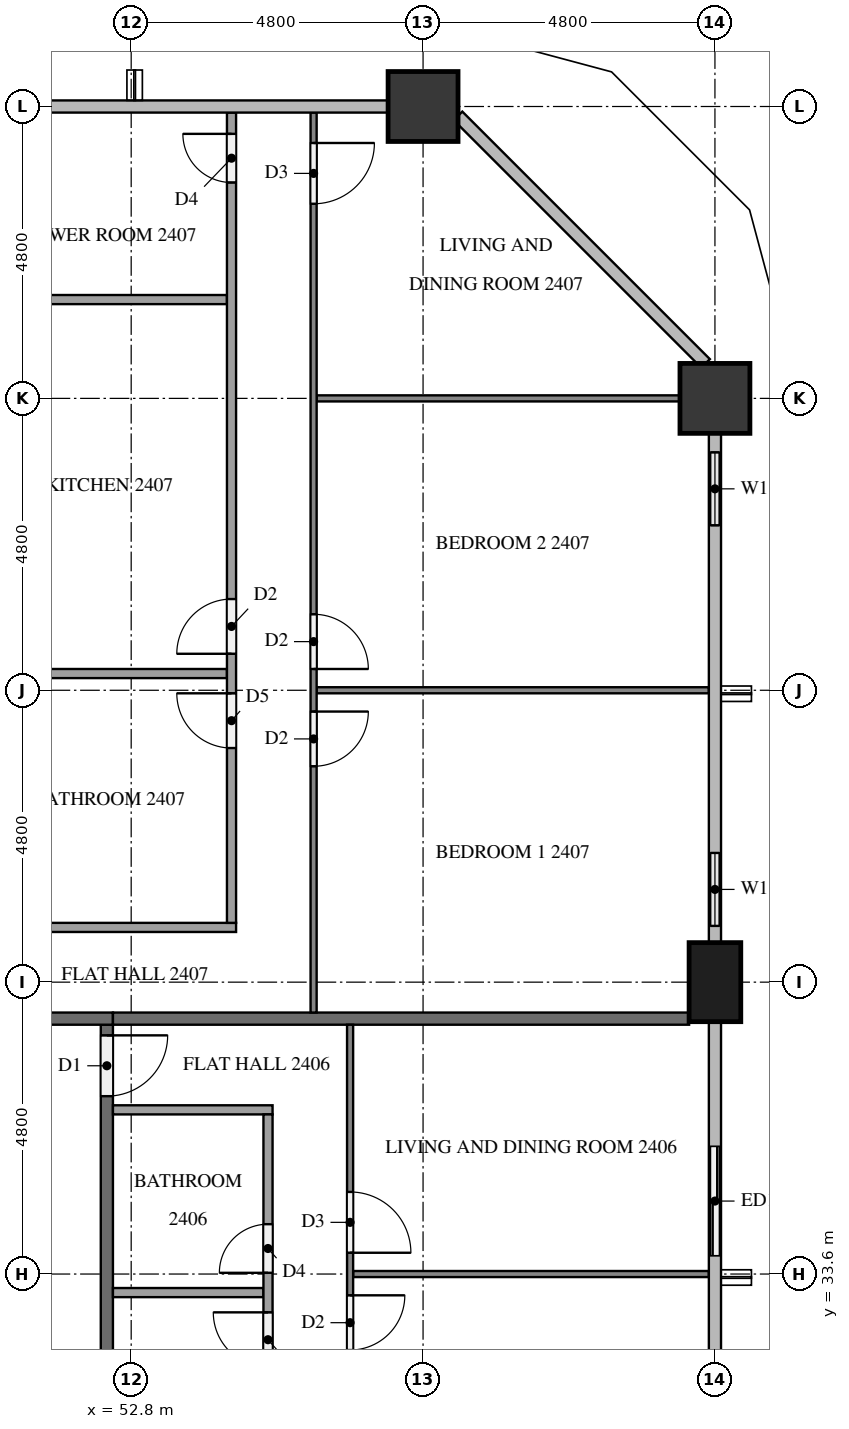
"""IFC4 building model, lengths in metres.
Left out: names, types, materials, properties, quantities, classifications, styles, units other than length and angle.
Written with IfcOpenShell. Run it as: python <this file> out.ifc"""

import sys

from ifc_helpers import new_model, si_unit, direction, frame, frame_2d, origin, origin_2d, place, context, subcontext, project, spatial, rectangle, extrude, element, fill, save


model = new_model("IFC4")
c1 = context("Model", 3, precision=1e-05, world=origin(), true_north=direction((0.0, 1.0)))
c2 = subcontext(c1, "Body", "Model", "MODEL_VIEW")
j1 = project(units=[si_unit("LENGTHUNIT", "METRE"), si_unit("PLANEANGLEUNIT", "RADIAN")], contexts=[c1])
p1 = place(None, origin())
s1 = spatial("IfcSite", under=j1, at=p1, CompositionType="ELEMENT")
p2 = place(p1, origin())
s2 = spatial("IfcBuilding", under=s1, at=p2, CompositionType="ELEMENT")
p3 = place(p2, frame((0.0, 0.0, 96.2)))
s3 = spatial("IfcBuildingStorey", under=s2, at=p3, CompositionType="ELEMENT", Elevation=96.2)
p4 = place(p3, frame((62.4, 38.4, 0.0), z_axis=(0.0, 0.0, 1.0), x_axis=(0.0, 1.0, 0.0)))
e1 = element("IfcColumn", 1, at=p4, inside=s3, PredefinedType="COLUMN", context=c2, shape_type="SweptSolid", body=[
    extrude(rectangle(XDim=1.3, YDim=0.85, at=origin_2d()), origin(), (0.0, 0.0, 1.0), 3.2),
])
for number, where, z_axis, x_axis in (
    (2, (62.4, 48.0, 0.0), (0.0, 0.0, 1.0), (1.0, 0.0, 0.0)),
    (3, (57.6, 52.8, 0.0), (0.0, 0.0, 1.0), (1.0, 0.0, 0.0)),
):
    element("IfcColumn", number, at=place(p3, frame(where, z_axis=z_axis, x_axis=x_axis)), inside=s3, PredefinedType="COLUMN", context=c2, shape_type="SweptSolid", body=[
        extrude(rectangle(XDim=1.15, YDim=1.15, at=origin_2d()), origin(), (0.0, 0.0, 1.0), 3.2),
    ])
p5 = place(p3, frame((62.4, 33.6, 0.0), z_axis=(0.0, 0.0, 1.0), x_axis=(0.0, 1.0, 0.0)))
e4 = element("IfcWall", 4, at=p5, inside=s3, PredefinedType="SOLIDWALL", context=c2, shape_type="SweptSolid", body=[
    extrude(rectangle(XDim=2.4, YDim=0.15, at=frame_2d((1.2, 0.0))), origin(), (0.0, 0.0, 1.0), 3.2),
])
p6 = place(p5, frame((0.3, 0.0, 0.0)))
e5 = element("IfcOpeningElement", 5, at=p6, cuts=e4, PredefinedType="OPENING", context=c2, shape_type="SweptSolid", body=[
    extrude(rectangle(XDim=1.8, YDim=2.4, at=frame_2d((0.9, 1.2))), frame((0.0, 0.085, 0.0), z_axis=(0.0, -1.0, 0.0), x_axis=(1.0, 0.0, 0.0)), (0.0, 0.0, 1.0), 0.17),
])
p7 = place(p3, frame((62.4, 39.05, 0.0), z_axis=(0.0, 0.0, 1.0), x_axis=(0.0, 1.0, 0.0)))
e6 = element("IfcWall", 6, at=p7, inside=s3, PredefinedType="SOLIDWALL", context=c2, shape_type="SweptSolid", body=[
    extrude(rectangle(XDim=1.75, YDim=0.15, at=frame_2d((0.875, 0.0))), origin(), (0.0, 0.0, 1.0), 3.2),
])
p8 = place(p7, frame((0.275, 0.0, 0.9)))
e7 = element("IfcOpeningElement", 7, at=p8, cuts=e6, PredefinedType="OPENING", context=c2, shape_type="SweptSolid", body=[
    extrude(rectangle(XDim=1.2, YDim=1.4, at=frame_2d((0.6, 0.7))), frame((0.0, 0.085, 0.0), z_axis=(0.0, -1.0, 0.0), x_axis=(1.0, 0.0, 0.0)), (0.0, 0.0, 1.0), 0.17),
])
p9 = place(p3, frame((62.4, 45.6, 0.0), z_axis=(0.0, 0.0, 1.0), x_axis=(0.0, 1.0, 0.0)))
e8 = element("IfcWall", 8, at=p9, inside=s3, PredefinedType="SOLIDWALL", context=c2, shape_type="SweptSolid", body=[
    extrude(rectangle(XDim=1.825, YDim=0.15, at=frame_2d((0.913, 0.0))), origin(), (0.0, 0.0, 1.0), 3.2),
])
p10 = place(p9, frame((0.312, 0.0, 0.9)))
e9 = element("IfcOpeningElement", 9, at=p10, cuts=e8, PredefinedType="OPENING", context=c2, shape_type="SweptSolid", body=[
    extrude(rectangle(XDim=1.2, YDim=1.4, at=frame_2d((0.6, 0.7))), frame((0.0, 0.085, 0.0), z_axis=(0.0, -1.0, 0.0), x_axis=(1.0, 0.0, 0.0)), (0.0, 0.0, 1.0), 0.17),
])
p11 = place(p3, frame((52.4, 37.7, 0.0), z_axis=(0.0, 0.0, 1.0), x_axis=(0.0, -1.0, 0.0)))
e10 = element("IfcWall", 10, at=p11, inside=s3, PredefinedType="PARTITIONING", context=c2, shape_type="SweptSolid", body=[
    extrude(rectangle(XDim=22.6, YDim=0.2, at=frame_2d((11.3, 0.0))), origin(), (0.0, 0.0, 1.0), 3.2),
])
p12 = place(p11, frame((21.425, 0.0, 0.0)))
e11 = element("IfcOpeningElement", 11, at=p12, cuts=e10, PredefinedType="OPENING", context=c2, shape_type="SweptSolid", body=[
    extrude(rectangle(XDim=1.0, YDim=2.1, at=frame_2d((0.5, 1.05))), frame((0.0, 0.11, 0.0), z_axis=(0.0, -1.0, 0.0), x_axis=(1.0, 0.0, 0.0)), (0.0, 0.0, 1.0), 0.22),
])
p13 = place(p11, frame((0.175, 0.0, 0.0)))
e12 = element("IfcOpeningElement", 12, at=p13, cuts=e10, PredefinedType="OPENING", context=c2, shape_type="SweptSolid", body=[
    extrude(rectangle(XDim=1.0, YDim=2.1, at=frame_2d((0.5, 1.05))), frame((0.0, 0.11, 0.0), z_axis=(0.0, -1.0, 0.0), x_axis=(1.0, 0.0, 0.0)), (0.0, 0.0, 1.0), 0.22),
])
p14 = place(p3, frame((52.5, 37.8, 0.0), z_axis=(0.0, 0.0, 1.0), x_axis=(-1.0, 0.0, 0.0)))
e13 = element("IfcWall", 13, at=p14, inside=s3, PredefinedType="PARTITIONING", context=c2, shape_type="SweptSolid", body=[
    extrude(rectangle(XDim=2.2, YDim=0.2, at=frame_2d((1.1, 0.0))), origin(), (0.0, 0.0, 1.0), 3.2),
])
p15 = place(p3, frame((52.5, 37.8, 0.0), z_axis=(0.0, 0.0, 1.0), x_axis=(1.0, 0.0, 0.0)))
e14 = element("IfcWall", 14, at=p15, inside=s3, PredefinedType="PARTITIONING", context=c2, shape_type="SweptSolid", body=[
    extrude(rectangle(XDim=9.475, YDim=0.2, at=frame_2d((4.738, 0.0))), origin(), (0.0, 0.0, 1.0), 3.2),
])
p16 = place(p3, frame((56.45, 33.6, 0.0), z_axis=(0.0, 0.0, 1.0), x_axis=(1.0, 0.0, 0.0)))
e15 = element("IfcWall", 15, at=p16, inside=s3, PredefinedType="PARTITIONING", context=c2, shape_type="SweptSolid", body=[
    extrude(rectangle(XDim=5.85, YDim=0.1, at=frame_2d((2.925, 0.0))), origin(), (0.0, 0.0, 1.0), 3.2),
])
p17 = place(p3, frame((56.4, 37.7, 0.0), z_axis=(0.0, 0.0, 1.0), x_axis=(0.0, -1.0, 0.0)))
e16 = element("IfcWall", 16, at=p17, inside=s3, PredefinedType="PARTITIONING", context=c2, shape_type="SweptSolid", body=[
    extrude(rectangle(XDim=8.8, YDim=0.1, at=frame_2d((4.4, 0.0))), origin(), (0.0, 0.0, 1.0), 3.2),
])
p18 = place(p17, frame((2.75, 0.0, 0.0)))
e17 = element("IfcOpeningElement", 17, at=p18, cuts=e16, PredefinedType="OPENING", context=c2, shape_type="SweptSolid", body=[
    extrude(rectangle(XDim=1.0, YDim=2.1, at=frame_2d((0.5, 1.05))), frame((0.0, 0.06, 0.0), z_axis=(0.0, -1.0, 0.0), x_axis=(1.0, 0.0, 0.0)), (0.0, 0.0, 1.0), 0.12),
])
p19 = place(p17, frame((4.45, 0.0, 0.0)))
e18 = element("IfcOpeningElement", 18, at=p19, cuts=e16, PredefinedType="OPENING", context=c2, shape_type="SweptSolid", body=[
    extrude(rectangle(XDim=0.9, YDim=2.1, at=frame_2d((0.45, 1.05))), frame((0.0, 0.06, 0.0), z_axis=(0.0, -1.0, 0.0), x_axis=(1.0, 0.0, 0.0)), (0.0, 0.0, 1.0), 0.12),
])
p20 = place(p3, frame((52.5, 33.295, 0.0), z_axis=(0.0, 0.0, 1.0), x_axis=(1.0, 0.0, 0.0)))
e19 = element("IfcWall", 19, at=p20, inside=s3, PredefinedType="PARTITIONING", context=c2, shape_type="SweptSolid", body=[
    extrude(rectangle(XDim=2.475, YDim=0.15, at=frame_2d((1.238, 0.0))), origin(), (0.0, 0.0, 1.0), 3.2),
])
p21 = place(p3, frame((52.5, 36.3, 0.0), z_axis=(0.0, 0.0, 1.0), x_axis=(1.0, 0.0, 0.0)))
e20 = element("IfcWall", 20, at=p21, inside=s3, PredefinedType="PARTITIONING", context=c2, shape_type="SweptSolid", body=[
    extrude(rectangle(XDim=2.625, YDim=0.15, at=frame_2d((1.312, 0.0))), origin(), (0.0, 0.0, 1.0), 3.2),
])
p22 = place(p3, frame((55.05, 28.9, 0.0), z_axis=(0.0, 0.0, 1.0), x_axis=(0.0, 1.0, 0.0)))
e21 = element("IfcWall", 21, at=p22, inside=s3, PredefinedType="PARTITIONING", context=c2, shape_type="SweptSolid", body=[
    extrude(rectangle(XDim=7.325, YDim=0.15, at=frame_2d((3.663, 0.0))), origin(), (0.0, 0.0, 1.0), 3.2),
])
p23 = place(p22, frame((4.72, 0.0, 0.0)))
e22 = element("IfcOpeningElement", 22, at=p23, cuts=e21, PredefinedType="OPENING", context=c2, shape_type="SweptSolid", body=[
    extrude(rectangle(XDim=0.8, YDim=2.1, at=frame_2d((0.4, 1.05))), frame((0.0, 0.085, 0.0), z_axis=(0.0, -1.0, 0.0), x_axis=(1.0, 0.0, 0.0)), (0.0, 0.0, 1.0), 0.17),
])
p24 = place(p22, frame((3.17, 0.0, 0.0)))
e23 = element("IfcOpeningElement", 23, at=p24, cuts=e21, PredefinedType="OPENING", context=c2, shape_type="SweptSolid", body=[
    extrude(rectangle(XDim=0.9, YDim=2.1, at=frame_2d((0.45, 1.05))), frame((0.0, 0.085, 0.0), z_axis=(0.0, -1.0, 0.0), x_axis=(1.0, 0.0, 0.0)), (0.0, 0.0, 1.0), 0.17),
])
p25 = place(p3, frame((55.85, 43.2, 0.0), z_axis=(0.0, 0.0, 1.0), x_axis=(1.0, 0.0, 0.0)))
e24 = element("IfcWall", 24, at=p25, inside=s3, PredefinedType="PARTITIONING", context=c2, shape_type="SweptSolid", body=[
    extrude(rectangle(XDim=6.45, YDim=0.1, at=frame_2d((3.225, 0.0))), origin(), (0.0, 0.0, 1.0), 3.2),
])
p26 = place(p3, frame((55.85, 48.0, 0.0), z_axis=(0.0, 0.0, 1.0), x_axis=(1.0, 0.0, 0.0)))
e25 = element("IfcWall", 25, at=p26, inside=s3, PredefinedType="PARTITIONING", context=c2, shape_type="SweptSolid", body=[
    extrude(rectangle(XDim=5.975, YDim=0.1, at=frame_2d((2.987, 0.0))), origin(), (0.0, 0.0, 1.0), 3.2),
])
p27 = place(p3, frame((55.8, 52.7, 0.0), z_axis=(0.0, 0.0, 1.0), x_axis=(0.0, -1.0, 0.0)))
e26 = element("IfcWall", 26, at=p27, inside=s3, PredefinedType="PARTITIONING", context=c2, shape_type="SweptSolid", body=[
    extrude(rectangle(XDim=14.8, YDim=0.1, at=frame_2d((7.4, 0.0))), origin(), (0.0, 0.0, 1.0), 3.2),
])
p28 = place(p27, frame((9.85, 0.0, 0.0)))
e27 = element("IfcOpeningElement", 27, at=p28, cuts=e26, PredefinedType="OPENING", context=c2, shape_type="SweptSolid", body=[
    extrude(rectangle(XDim=0.9, YDim=2.1, at=frame_2d((0.45, 1.05))), frame((0.0, 0.06, 0.0), z_axis=(0.0, -1.0, 0.0), x_axis=(1.0, 0.0, 0.0)), (0.0, 0.0, 1.0), 0.12),
])
p29 = place(p27, frame((8.25, 0.0, 0.0)))
e28 = element("IfcOpeningElement", 28, at=p29, cuts=e26, PredefinedType="OPENING", context=c2, shape_type="SweptSolid", body=[
    extrude(rectangle(XDim=0.9, YDim=2.1, at=frame_2d((0.45, 1.05))), frame((0.0, 0.06, 0.0), z_axis=(0.0, -1.0, 0.0), x_axis=(1.0, 0.0, 0.0)), (0.0, 0.0, 1.0), 0.12),
])
p30 = place(p27, frame((0.5, 0.0, 0.0)))
e29 = element("IfcOpeningElement", 29, at=p30, cuts=e26, PredefinedType="OPENING", context=c2, shape_type="SweptSolid", body=[
    extrude(rectangle(XDim=1.0, YDim=2.1, at=frame_2d((0.5, 1.05))), frame((0.0, 0.06, 0.0), z_axis=(0.0, -1.0, 0.0), x_axis=(1.0, 0.0, 0.0)), (0.0, 0.0, 1.0), 0.12),
])
for number, where, z_axis, x_axis in (
    (30, (50.5, 43.475, 0.0), (0.0, 0.0, 1.0), (1.0, 0.0, 0.0)),
    (31, (50.5, 49.625, 0.0), (0.0, 0.0, 1.0), (1.0, 0.0, 0.0)),
):
    element("IfcWall", number, at=place(p3, frame(where, z_axis=z_axis, x_axis=x_axis)), inside=s3, PredefinedType="PARTITIONING", context=c2, shape_type="SweptSolid", body=[
        extrude(rectangle(XDim=3.875, YDim=0.15, at=frame_2d((1.938, 0.0))), origin(), (0.0, 0.0, 1.0), 3.2),
    ])
p31 = place(p3, frame((50.5, 39.3, 0.0), z_axis=(0.0, 0.0, 1.0), x_axis=(1.0, 0.0, 0.0)))
e32 = element("IfcWall", 32, at=p31, inside=s3, PredefinedType="PARTITIONING", context=c2, shape_type="SweptSolid", body=[
    extrude(rectangle(XDim=4.025, YDim=0.15, at=frame_2d((2.012, 0.0))), origin(), (0.0, 0.0, 1.0), 3.2),
])
p32 = place(p3, frame((54.45, 39.375, 0.0), z_axis=(0.0, 0.0, 1.0), x_axis=(0.0, 1.0, 0.0)))
e33 = element("IfcWall", 33, at=p32, inside=s3, PredefinedType="PARTITIONING", context=c2, shape_type="SweptSolid", body=[
    extrude(rectangle(XDim=13.325, YDim=0.15, at=frame_2d((6.663, 0.0))), origin(), (0.0, 0.0, 1.0), 3.2),
])
p33 = place(p32, frame((2.875, 0.0, 0.0)))
e34 = element("IfcOpeningElement", 34, at=p33, cuts=e33, PredefinedType="OPENING", context=c2, shape_type="SweptSolid", body=[
    extrude(rectangle(XDim=0.9, YDim=2.1, at=frame_2d((0.45, 1.05))), frame((0.0, 0.085, 0.0), z_axis=(0.0, -1.0, 0.0), x_axis=(1.0, 0.0, 0.0)), (0.0, 0.0, 1.0), 0.17),
])
p34 = place(p32, frame((4.425, 0.0, 0.0)))
e35 = element("IfcOpeningElement", 35, at=p34, cuts=e33, PredefinedType="OPENING", context=c2, shape_type="SweptSolid", body=[
    extrude(rectangle(XDim=0.9, YDim=2.1, at=frame_2d((0.45, 1.05))), frame((0.0, 0.085, 0.0), z_axis=(0.0, -1.0, 0.0), x_axis=(1.0, 0.0, 0.0)), (0.0, 0.0, 1.0), 0.17),
])
p35 = place(p32, frame((12.175, 0.0, 0.0)))
e36 = element("IfcOpeningElement", 36, at=p35, cuts=e33, PredefinedType="OPENING", context=c2, shape_type="SweptSolid", body=[
    extrude(rectangle(XDim=0.8, YDim=2.1, at=frame_2d((0.4, 1.05))), frame((0.0, 0.085, 0.0), z_axis=(0.0, -1.0, 0.0), x_axis=(1.0, 0.0, 0.0)), (0.0, 0.0, 1.0), 0.17),
])
p36 = place(p6, origin())
e37 = element("IfcDoor", 37, at=p36, inside=s3, OperationType="SLIDING_TO_LEFT", PredefinedType="DOOR", context=c2, shape_type="SweptSolid", body=[
    extrude(rectangle(XDim=1.8, YDim=2.4, at=frame_2d((0.9, 1.2))), frame((0.0, 0.025, 0.0), z_axis=(0.0, -1.0, 0.0), x_axis=(1.0, 0.0, 0.0)), (0.0, 0.0, 1.0), 0.05),
])
fill(e5, e37)
p37 = place(p8, origin())
e38 = element("IfcWindow", 38, at=p37, inside=s3, PartitioningType="SINGLE_PANEL", PredefinedType="WINDOW", context=c2, shape_type="SweptSolid", body=[
    extrude(rectangle(XDim=1.2, YDim=1.4, at=frame_2d((0.6, 0.7))), frame((0.0, 0.03, 0.0), z_axis=(0.0, -1.0, 0.0), x_axis=(1.0, 0.0, 0.0)), (0.0, 0.0, 1.0), 0.06),
])
fill(e7, e38)
p38 = place(p10, origin())
e39 = element("IfcWindow", 39, at=p38, inside=s3, PartitioningType="SINGLE_PANEL", PredefinedType="WINDOW", context=c2, shape_type="SweptSolid", body=[
    extrude(rectangle(XDim=1.2, YDim=1.4, at=frame_2d((0.6, 0.7))), frame((0.0, 0.03, 0.0), z_axis=(0.0, -1.0, 0.0), x_axis=(1.0, 0.0, 0.0)), (0.0, 0.0, 1.0), 0.06),
])
fill(e9, e39)
p39 = place(p13, origin())
e40 = element("IfcDoor", 40, at=p39, inside=s3, OperationType="SINGLE_SWING_LEFT", PredefinedType="DOOR", context=c2, shape_type="SweptSolid", body=[
    extrude(rectangle(XDim=1.0, YDim=2.1, at=frame_2d((0.5, 1.05))), frame((0.0, 0.025, 0.0), z_axis=(0.0, -1.0, 0.0), x_axis=(1.0, 0.0, 0.0)), (0.0, 0.0, 1.0), 0.05),
])
fill(e12, e40)
p40 = place(p18, origin())
e41 = element("IfcDoor", 41, at=p40, inside=s3, OperationType="SINGLE_SWING_RIGHT", PredefinedType="DOOR", context=c2, shape_type="SweptSolid", body=[
    extrude(rectangle(XDim=1.0, YDim=2.1, at=frame_2d((0.5, 1.05))), frame((0.0, 0.025, 0.0), z_axis=(0.0, -1.0, 0.0), x_axis=(1.0, 0.0, 0.0)), (0.0, 0.0, 1.0), 0.05),
])
fill(e17, e41)
p41 = place(p19, origin())
e42 = element("IfcDoor", 42, at=p41, inside=s3, OperationType="SINGLE_SWING_LEFT", PredefinedType="DOOR", context=c2, shape_type="SweptSolid", body=[
    extrude(rectangle(XDim=0.9, YDim=2.1, at=frame_2d((0.45, 1.05))), frame((0.0, 0.025, 0.0), z_axis=(0.0, -1.0, 0.0), x_axis=(1.0, 0.0, 0.0)), (0.0, 0.0, 1.0), 0.05),
])
fill(e18, e42)
p42 = place(p23, origin())
e43 = element("IfcDoor", 43, at=p42, inside=s3, OperationType="SINGLE_SWING_LEFT", PredefinedType="DOOR", context=c2, shape_type="SweptSolid", body=[
    extrude(rectangle(XDim=0.8, YDim=2.1, at=frame_2d((0.4, 1.05))), frame((0.0, 0.025, 0.0), z_axis=(0.0, -1.0, 0.0), x_axis=(1.0, 0.0, 0.0)), (0.0, 0.0, 1.0), 0.05),
])
fill(e22, e43)
p43 = place(p24, origin())
e44 = element("IfcDoor", 44, at=p43, inside=s3, OperationType="SINGLE_SWING_RIGHT", PredefinedType="DOOR", context=c2, shape_type="SweptSolid", body=[
    extrude(rectangle(XDim=0.9, YDim=2.1, at=frame_2d((0.45, 1.05))), frame((0.0, 0.025, 0.0), z_axis=(0.0, -1.0, 0.0), x_axis=(1.0, 0.0, 0.0)), (0.0, 0.0, 1.0), 0.05),
])
fill(e23, e44)
p44 = place(p28, origin())
e45 = element("IfcDoor", 45, at=p44, inside=s3, OperationType="SINGLE_SWING_LEFT", PredefinedType="DOOR", context=c2, shape_type="SweptSolid", body=[
    extrude(rectangle(XDim=0.9, YDim=2.1, at=frame_2d((0.45, 1.05))), frame((0.0, 0.025, 0.0), z_axis=(0.0, -1.0, 0.0), x_axis=(1.0, 0.0, 0.0)), (0.0, 0.0, 1.0), 0.05),
])
fill(e27, e45)
p45 = place(p29, origin())
e46 = element("IfcDoor", 46, at=p45, inside=s3, OperationType="SINGLE_SWING_RIGHT", PredefinedType="DOOR", context=c2, shape_type="SweptSolid", body=[
    extrude(rectangle(XDim=0.9, YDim=2.1, at=frame_2d((0.45, 1.05))), frame((0.0, 0.025, 0.0), z_axis=(0.0, -1.0, 0.0), x_axis=(1.0, 0.0, 0.0)), (0.0, 0.0, 1.0), 0.05),
])
fill(e28, e46)
p46 = place(p30, origin())
e47 = element("IfcDoor", 47, at=p46, inside=s3, OperationType="SINGLE_SWING_LEFT", PredefinedType="DOOR", context=c2, shape_type="SweptSolid", body=[
    extrude(rectangle(XDim=1.0, YDim=2.1, at=frame_2d((0.5, 1.05))), frame((0.0, 0.025, 0.0), z_axis=(0.0, -1.0, 0.0), x_axis=(1.0, 0.0, 0.0)), (0.0, 0.0, 1.0), 0.05),
])
fill(e29, e47)
p47 = place(p33, origin())
e48 = element("IfcDoor", 48, at=p47, inside=s3, OperationType="SINGLE_SWING_RIGHT", PredefinedType="DOOR", context=c2, shape_type="SweptSolid", body=[
    extrude(rectangle(XDim=0.9, YDim=2.1, at=frame_2d((0.45, 1.05))), frame((0.0, 0.025, 0.0), z_axis=(0.0, -1.0, 0.0), x_axis=(1.0, 0.0, 0.0)), (0.0, 0.0, 1.0), 0.05),
])
fill(e34, e48)
p48 = place(p34, origin())
e49 = element("IfcDoor", 49, at=p48, inside=s3, OperationType="SINGLE_SWING_LEFT", PredefinedType="DOOR", context=c2, shape_type="SweptSolid", body=[
    extrude(rectangle(XDim=0.9, YDim=2.1, at=frame_2d((0.45, 1.05))), frame((0.0, 0.025, 0.0), z_axis=(0.0, -1.0, 0.0), x_axis=(1.0, 0.0, 0.0)), (0.0, 0.0, 1.0), 0.05),
])
fill(e35, e49)
p49 = place(p35, origin())
e50 = element("IfcDoor", 50, at=p49, inside=s3, OperationType="SINGLE_SWING_RIGHT", PredefinedType="DOOR", context=c2, shape_type="SweptSolid", body=[
    extrude(rectangle(XDim=0.8, YDim=2.1, at=frame_2d((0.4, 1.05))), frame((0.0, 0.025, 0.0), z_axis=(0.0, -1.0, 0.0), x_axis=(1.0, 0.0, 0.0)), (0.0, 0.0, 1.0), 0.05),
])
fill(e36, e50)
save(model, sys.argv[1])
